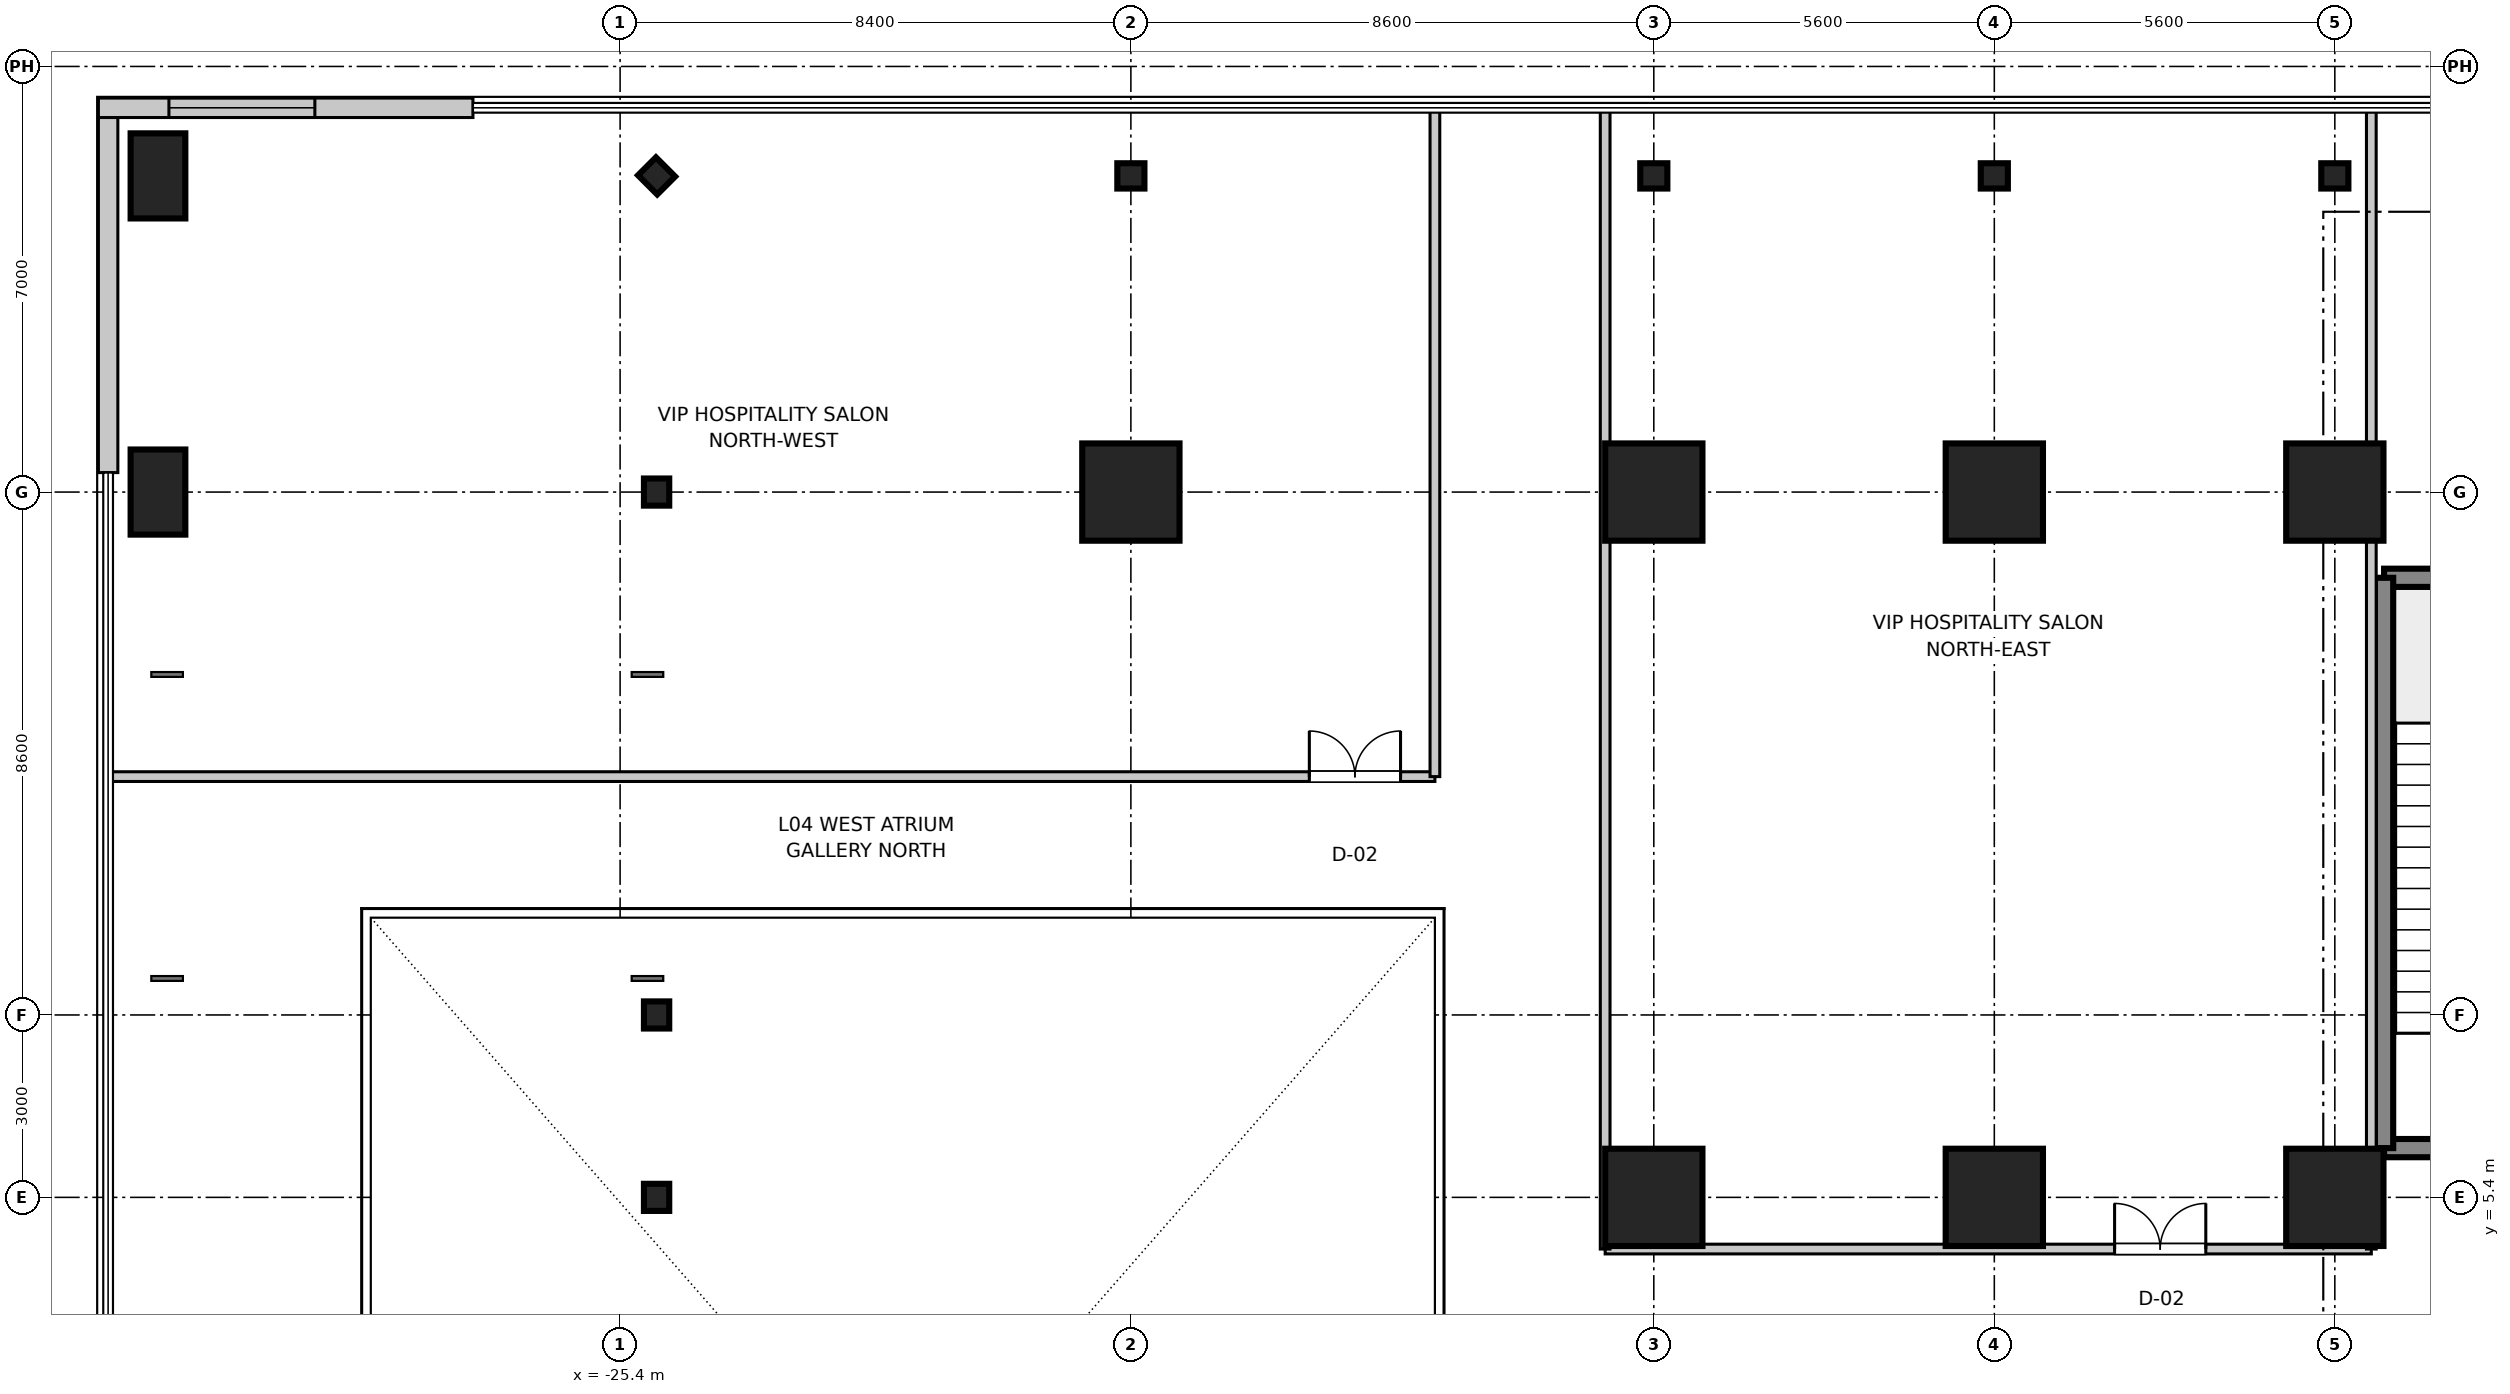
"""IFC4 building model, lengths in metres.
Left out: names, types, materials, properties, quantities, classifications, styles, units other than length and angle.
Written with IfcOpenShell. Run it as: python <this file> out.ifc"""

import sys

from ifc_helpers import new_model, si_unit, direction, frame, frame_2d, origin, origin_2d, place, context, subcontext, project, spatial, rectangle, i_section, extrude, source, transform, mapped, element, fill, save


model = new_model("IFC4")
c1 = context("Model", 3, precision=1e-05, world=origin(), true_north=direction((0.0, 1.0)))
c2 = subcontext(c1, "Body", "Model", "MODEL_VIEW")
j1 = project(units=[si_unit("LENGTHUNIT", "METRE"), si_unit("PLANEANGLEUNIT", "RADIAN")], contexts=[c1])
p1 = place(None, origin())
s1 = spatial("IfcSite", under=j1, at=p1, CompositionType="ELEMENT")
p2 = place(p1, origin())
s2 = spatial("IfcBuilding", under=s1, at=p2, CompositionType="ELEMENT")
p3 = place(p2, frame((0.0, 0.0, 21.6)))
s3 = spatial("IfcBuildingStorey", under=s2, at=p3, CompositionType="ELEMENT", Elevation=21.6)
m1 = source(origin(), c2, "Body", "SweptSolid", [
    extrude(rectangle(XDim=1.6, YDim=1.6, at=origin_2d()), origin(), (0.0, 0.0, 1.0), 5.355),
])
for number, where, z_axis, x_axis in (
    (1, (-17.0, 17.0, 0.0), (0.0, 0.0, 1.0), (1.0, 0.0, 0.0)),
    (2, (-8.4, 5.4, 0.0), (0.0, 0.0, 1.0), (1.0, 0.0, 0.0)),
    (3, (-8.4, 17.0, 0.0), (0.0, 0.0, 1.0), (1.0, 0.0, 0.0)),
    (4, (-2.8, 5.4, 0.0), (0.0, 0.0, 1.0), (1.0, 0.0, 0.0)),
    (5, (-2.8, 17.0, 0.0), (0.0, 0.0, 1.0), (1.0, 0.0, 0.0)),
    (6, (2.8, 5.4, 0.0), (0.0, 0.0, 1.0), (1.0, 0.0, 0.0)),
    (7, (2.8, 17.0, 0.0), (0.0, 0.0, 1.0), (1.0, 0.0, 0.0)),
):
    element("IfcColumn", number, at=place(p3, frame(where, z_axis=z_axis, x_axis=x_axis)), inside=s3, PredefinedType="COLUMN", context=c2, shape_type="MappedRepresentation", body=[
        mapped(m1, transform((0.0, 0.0, 0.0), scale=1.0)),
    ])
m2 = source(origin(), c2, "Body", "SweptSolid", [
    extrude(rectangle(XDim=0.9, YDim=1.4, at=origin_2d()), origin(), (0.0, 0.0, 1.0), 5.355),
])
for number, where, z_axis, x_axis in (
    (8, (-33.0, 17.0, 0.0), (0.0, 0.0, 1.0), (1.0, 0.0, 0.0)),
    (9, (-33.0, 22.2, 0.0), (0.0, 0.0, 1.0), (1.0, 0.0, 0.0)),
):
    element("IfcColumn", number, at=place(p3, frame(where, z_axis=z_axis, x_axis=x_axis)), inside=s3, PredefinedType="PILASTER", context=c2, shape_type="MappedRepresentation", body=[
        mapped(m2, transform((0.0, 0.0, 0.0), scale=1.0)),
    ])
m3 = source(origin(), c2, "Body", "SweptSolid", [
    extrude(i_section(OverallWidth=0.416, OverallDepth=0.446, WebThickness=0.025, FlangeThickness=0.04, at=origin_2d()), origin(), (0.0, 0.0, 1.0), 5.255),
])
for number, where, z_axis, x_axis in (
    (10, (-24.8, 5.4, 0.0), (0.0, 0.0, 1.0), (1.0, 0.0, 0.0)),
    (11, (-24.8, 8.4, 0.0), (0.0, 0.0, 1.0), (1.0, 0.0, 0.0)),
    (12, (-24.8, 17.0, 0.0), (0.0, 0.0, 1.0), (1.0, 0.0, 0.0)),
    (13, (-17.0, 22.2, 0.0), (0.0, 0.0, 1.0), (0.0, 1.0, 0.0)),
    (14, (-8.4, 22.2, 0.0), (0.0, 0.0, 1.0), (0.0, 1.0, 0.0)),
    (15, (-2.8, 22.2, 0.0), (0.0, 0.0, 1.0), (0.0, 1.0, 0.0)),
    (16, (2.8, 22.2, 0.0), (0.0, 0.0, 1.0), (0.0, 1.0, 0.0)),
    (17, (-24.8, 22.2, 0.0), (0.0, 0.0, 1.0), (0.707, 0.707, 0.0)),
):
    element("IfcColumn", number, at=place(p3, frame(where, z_axis=z_axis, x_axis=x_axis)), inside=s3, PredefinedType="COLUMN", context=c2, shape_type="MappedRepresentation", body=[
        mapped(m3, transform((0.0, 0.0, 0.0), scale=1.0)),
    ])
m4 = source(origin(), c2, "Body", "SweptSolid", [
    extrude(rectangle(XDim=3.98, YDim=0.3, at=frame_2d((1.99, 0.0))), origin(), (0.0, 0.0, 1.0), 4.98),
])
for number, where, z_axis, x_axis in (
    (18, (3.61, 6.21, 0.0), (0.0, 0.0, 1.0), (1.0, 0.0, 0.0)),
    (19, (3.61, 15.59, 0.0), (0.0, 0.0, 1.0), (1.0, 0.0, 0.0)),
):
    element("IfcWall", number, at=place(p3, frame(where, z_axis=z_axis, x_axis=x_axis)), inside=s3, PredefinedType="SHEAR", context=c2, shape_type="MappedRepresentation", body=[
        mapped(m4, transform((0.0, 0.0, 0.0), scale=1.0)),
    ])
m5 = source(origin(), c2, "Body", "SweptSolid", [
    extrude(rectangle(XDim=9.38, YDim=0.3, at=frame_2d((4.69, 0.0))), origin(), (0.0, 0.0, 1.0), 4.98),
])
p4 = place(p3, frame((3.61, 6.21, 0.0), z_axis=(0.0, 0.0, 1.0), x_axis=(0.0, 1.0, 0.0)))
e20 = element("IfcWall", 20, at=p4, inside=s3, PredefinedType="SHEAR", context=c2, shape_type="MappedRepresentation", body=[
    mapped(m5, transform((0.0, 0.0, 0.0), scale=1.0)),
])
m6 = source(origin(), c2, "Body", "SweptSolid", [
    extrude(rectangle(XDim=6.16, YDim=0.32, at=frame_2d((3.08, 0.0))), origin(), (0.0, 0.0, 1.0), 4.98),
])
p5 = place(p3, frame((-33.98, 23.32, 0.0), z_axis=(0.0, 0.0, 1.0), x_axis=(1.0, 0.0, 0.0)))
e21 = element("IfcWall", 21, at=p5, inside=s3, PredefinedType="STANDARD", context=c2, shape_type="MappedRepresentation", body=[
    mapped(m6, transform((0.0, 0.0, 0.0), scale=1.0)),
])
p6 = place(p5, frame((1.16, 0.0, 0.9)))
e22 = element("IfcOpeningElement", 22, at=p6, cuts=e21, PredefinedType="OPENING", context=c2, shape_type="SweptSolid", body=[
    extrude(rectangle(XDim=2.4, YDim=2.2, at=frame_2d((1.2, 1.1))), frame((0.0, 0.17, 0.0), z_axis=(0.0, -1.0, 0.0), x_axis=(1.0, 0.0, 0.0)), (0.0, 0.0, 1.0), 0.34),
])
m7 = source(origin(), c2, "Body", "SweptSolid", [
    extrude(rectangle(XDim=5.84, YDim=0.32, at=frame_2d((2.92, 0.0))), origin(), (0.0, 0.0, 1.0), 4.98),
])
p7 = place(p3, frame((-33.82, 17.32, 0.0), z_axis=(0.0, 0.0, 1.0), x_axis=(0.0, 1.0, 0.0)))
e23 = element("IfcWall", 23, at=p7, inside=s3, PredefinedType="STANDARD", context=c2, shape_type="MappedRepresentation", body=[
    mapped(m7, transform((0.0, 0.0, 0.0), scale=1.0)),
])
m8 = source(origin(), c2, "Body", "SweptSolid", [
    extrude(rectangle(XDim=21.76, YDim=0.16, at=frame_2d((10.88, 0.0))), origin(), (0.0, 0.0, 1.0), 3.1),
])
p8 = place(p3, frame((-33.76, 12.32, 0.0), z_axis=(0.0, 0.0, 1.0), x_axis=(1.0, 0.0, 0.0)))
e24 = element("IfcWall", 24, at=p8, inside=s3, PredefinedType="PARTITIONING", context=c2, shape_type="MappedRepresentation", body=[
    mapped(m8, transform((0.0, 0.0, 0.0), scale=1.0)),
])
p9 = place(p8, frame((19.695, 0.0, 0.0)))
e25 = element("IfcOpeningElement", 25, at=p9, cuts=e24, PredefinedType="OPENING", context=c2, shape_type="SweptSolid", body=[
    extrude(rectangle(XDim=1.5, YDim=2.15, at=frame_2d((0.75, 1.075))), frame((0.0, 0.09, 0.0), z_axis=(0.0, -1.0, 0.0), x_axis=(1.0, 0.0, 0.0)), (0.0, 0.0, 1.0), 0.18),
])
m9 = source(origin(), c2, "Body", "SweptSolid", [
    extrude(rectangle(XDim=10.94, YDim=0.16, at=frame_2d((5.47, 0.0))), origin(), (0.0, 0.0, 1.0), 3.1),
])
p10 = place(p3, frame((-12.0, 12.32, 0.0), z_axis=(0.0, 0.0, 1.0), x_axis=(0.0, 1.0, 0.0)))
e26 = element("IfcWall", 26, at=p10, inside=s3, PredefinedType="PARTITIONING", context=c2, shape_type="MappedRepresentation", body=[
    mapped(m9, transform((0.0, 0.0, 0.0), scale=1.0)),
])
m10 = source(origin(), c2, "Body", "SweptSolid", [
    extrude(rectangle(XDim=12.6, YDim=0.16, at=frame_2d((6.3, 0.0))), origin(), (0.0, 0.0, 1.0), 3.1),
])
p11 = place(p3, frame((-9.2, 4.55, 0.0), z_axis=(0.0, 0.0, 1.0), x_axis=(1.0, 0.0, 0.0)))
e27 = element("IfcWall", 27, at=p11, inside=s3, PredefinedType="PARTITIONING", context=c2, shape_type="MappedRepresentation", body=[
    mapped(m10, transform((0.0, 0.0, 0.0), scale=1.0)),
])
p12 = place(p11, frame((8.378, 0.0, 0.0)))
e28 = element("IfcOpeningElement", 28, at=p12, cuts=e27, PredefinedType="OPENING", context=c2, shape_type="SweptSolid", body=[
    extrude(rectangle(XDim=1.5, YDim=2.15, at=frame_2d((0.75, 1.075))), frame((0.0, 0.09, 0.0), z_axis=(0.0, -1.0, 0.0), x_axis=(1.0, 0.0, 0.0)), (0.0, 0.0, 1.0), 0.18),
])
m11 = source(origin(), c2, "Body", "SweptSolid", [
    extrude(rectangle(XDim=18.71, YDim=0.16, at=frame_2d((9.355, 0.0))), origin(), (0.0, 0.0, 1.0), 3.1),
])
for number, where, z_axis, x_axis in (
    (29, (-9.2, 4.55, 0.0), (0.0, 0.0, 1.0), (0.0, 1.0, 0.0)),
    (30, (3.4, 4.55, 0.0), (0.0, 0.0, 1.0), (0.0, 1.0, 0.0)),
):
    element("IfcWall", number, at=place(p3, frame(where, z_axis=z_axis, x_axis=x_axis)), inside=s3, PredefinedType="PARTITIONING", context=c2, shape_type="MappedRepresentation", body=[
        mapped(m11, transform((0.0, 0.0, 0.0), scale=1.0)),
    ])
m12 = source(origin(), c2, "Body", "SweptSolid", [
    extrude(rectangle(XDim=2.4, YDim=2.2, at=frame_2d((1.2, 1.1))), frame((0.0, 0.03, 0.0), z_axis=(0.0, -1.0, 0.0), x_axis=(1.0, 0.0, 0.0)), (0.0, 0.0, 1.0), 0.06),
])
p13 = place(p6, origin())
e31 = element("IfcWindow", 31, at=p13, inside=s3, PartitioningType="SINGLE_PANEL", PredefinedType="WINDOW", context=c2, shape_type="MappedRepresentation", body=[
    mapped(m12, transform((0.0, 0.0, 0.0), scale=1.0)),
])
fill(e22, e31)
m13 = source(origin(), c2, "Body", "SweptSolid", [
    extrude(rectangle(XDim=1.5, YDim=2.15, at=frame_2d((0.75, 1.075))), frame((0.0, 0.025, 0.0), z_axis=(0.0, -1.0, 0.0), x_axis=(1.0, 0.0, 0.0)), (0.0, 0.0, 1.0), 0.05),
])
p14 = place(p9, origin())
e32 = element("IfcDoor", 32, at=p14, inside=s3, OperationType="DOUBLE_DOOR_SINGLE_SWING", PredefinedType="DOOR", context=c2, shape_type="MappedRepresentation", body=[
    mapped(m13, transform((0.0, 0.0, 0.0), scale=1.0)),
])
fill(e25, e32)
p15 = place(p12, origin())
e33 = element("IfcDoor", 33, at=p15, inside=s3, OperationType="DOUBLE_DOOR_SINGLE_SWING", PredefinedType="DOOR", context=c2, shape_type="MappedRepresentation", body=[
    mapped(m13, transform((0.0, 0.0, 0.0), scale=1.0)),
])
fill(e28, e33)
save(model, sys.argv[1])
